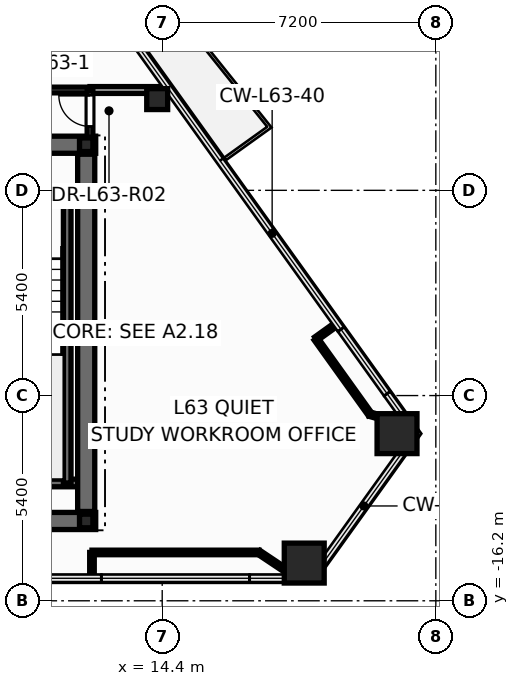
"""IFC4 building model, lengths in metres.
Left out: names, types, materials, properties, quantities, classifications, styles, units other than length and angle.
Written with IfcOpenShell. Run it as: python <this file> out.ifc"""

import sys

from ifc_helpers import new_model, si_unit, direction, frame, frame_2d, origin, origin_2d, place, context, subcontext, project, spatial, rectangle, hollow_rectangle, hollow_circle, i_section, extrude, element, fill, save


model = new_model("IFC4")
c1 = context("Model", 3, precision=1e-05, world=origin(), true_north=direction((0.0, 1.0)))
c2 = subcontext(c1, "Body", "Model", "MODEL_VIEW")
j1 = project(units=[si_unit("LENGTHUNIT", "METRE"), si_unit("PLANEANGLEUNIT", "RADIAN")], contexts=[c1])
p1 = place(None, origin())
s1 = spatial("IfcSite", under=j1, at=p1, CompositionType="ELEMENT")
p2 = place(p1, origin())
s2 = spatial("IfcBuilding", under=s1, at=p2, CompositionType="ELEMENT")
p3 = place(p2, frame((0.0, 0.0, 240.6)))
s3 = spatial("IfcBuildingStorey", under=s2, at=p3, CompositionType="ELEMENT", Elevation=240.6)
for number, where, z_axis, x_axis in (
    (1, (18.137, -15.208, 0.0), (0.0, 0.0, 1.0), (1.0, 0.0, 0.0)),
    (2, (20.579, -11.802, 0.0), (0.0, 0.0, 1.0), (1.0, 0.0, 0.0)),
):
    element("IfcColumn", number, at=place(p3, frame(where, z_axis=z_axis, x_axis=x_axis)), inside=s3, PredefinedType="COLUMN", context=c2, shape_type="SweptSolid", body=[
        extrude(hollow_rectangle(XDim=1.05, YDim=1.05, WallThickness=0.045, at=origin_2d()), origin(), (0.0, 0.0, 1.0), 3.6),
    ])
p4 = place(p3, frame((14.268, -2.999, 0.0), z_axis=(0.0, 0.0, 1.0), x_axis=(1.0, 0.0, 0.0)))
e3 = element("IfcColumn", 3, at=p4, inside=s3, PredefinedType="COLUMN", context=c2, shape_type="SweptSolid", body=[
    extrude(hollow_circle(Radius=0.275, WallThickness=0.024, at=origin_2d()), origin(), (0.0, 0.0, 1.0), 3.6),
])
for number, where, z_axis, x_axis in (
    (4, (12.4, -14.1, 0.0), (0.0, 0.0, 1.0), (1.0, 0.0, 0.0)),
    (5, (12.4, -4.2, 0.0), (0.0, 0.0, 1.0), (1.0, 0.0, 0.0)),
):
    element("IfcColumn", number, at=place(p3, frame(where, z_axis=z_axis, x_axis=x_axis)), inside=s3, PredefinedType="COLUMN", context=c2, shape_type="SweptSolid", body=[
        extrude(i_section(OverallWidth=0.352, OverallDepth=0.359, WebThickness=0.018, FlangeThickness=0.026, at=origin_2d()), origin(), (0.0, 0.0, 1.0), 3.6),
    ])
p5 = place(p3, frame((-12.65, -14.1, 0.0), z_axis=(0.0, 0.0, 1.0), x_axis=(1.0, 0.0, 0.0)))
e6 = element("IfcWall", 6, at=p5, inside=s3, PredefinedType="SHEAR", context=c2, shape_type="SweptSolid", body=[
    extrude(rectangle(XDim=25.3, YDim=0.45, at=frame_2d((12.65, 0.0))), origin(), (0.0, 0.0, 1.0), 3.6),
])
p6 = place(p3, frame((-12.65, -4.2, 0.0), z_axis=(0.0, 0.0, 1.0), x_axis=(1.0, 0.0, 0.0)))
e7 = element("IfcWall", 7, at=p6, inside=s3, PredefinedType="SHEAR", context=c2, shape_type="SweptSolid", body=[
    extrude(rectangle(XDim=25.3, YDim=0.45, at=frame_2d((12.65, 0.0))), origin(), (0.0, 0.0, 1.0), 3.6),
])
p7 = place(p6, frame((1.85, 0.0, 0.0)))
e8 = element("IfcOpeningElement", 8, at=p7, cuts=e7, PredefinedType="OPENING", context=c2, shape_type="SweptSolid", body=[
    extrude(rectangle(XDim=0.756, YDim=2.054, at=frame_2d((0.375, 1.027))), frame((0.0, 0.235, 0.0), z_axis=(0.0, -1.0, 0.0), x_axis=(1.0, 0.0, 0.0)), (0.0, 0.0, 1.0), 0.47),
])
p8 = place(p6, frame((22.65, 0.0, 0.0)))
e9 = element("IfcOpeningElement", 9, at=p8, cuts=e7, PredefinedType="OPENING", context=c2, shape_type="SweptSolid", body=[
    extrude(rectangle(XDim=0.756, YDim=2.054, at=frame_2d((0.375, 1.027))), frame((0.0, 0.235, 0.0), z_axis=(0.0, -1.0, 0.0), x_axis=(1.0, 0.0, 0.0)), (0.0, 0.0, 1.0), 0.47),
])
p9 = place(p6, frame((5.85, 0.0, 0.0)))
e10 = element("IfcOpeningElement", 10, at=p9, cuts=e7, PredefinedType="OPENING", context=c2, shape_type="SweptSolid", body=[
    extrude(rectangle(XDim=1.006, YDim=2.104, at=frame_2d((0.5, 1.052))), frame((0.0, 0.235, 0.0), z_axis=(0.0, -1.0, 0.0), x_axis=(1.0, 0.0, 0.0)), (0.0, 0.0, 1.0), 0.47),
])
p10 = place(p6, frame((10.35, 0.0, 0.0)))
e11 = element("IfcOpeningElement", 11, at=p10, cuts=e7, PredefinedType="OPENING", context=c2, shape_type="SweptSolid", body=[
    extrude(rectangle(XDim=1.406, YDim=2.154, at=frame_2d((0.7, 1.077))), frame((0.0, 0.235, 0.0), z_axis=(0.0, -1.0, 0.0), x_axis=(1.0, 0.0, 0.0)), (0.0, 0.0, 1.0), 0.47),
])
p11 = place(p6, frame((18.45, 0.0, 0.0)))
e12 = element("IfcOpeningElement", 12, at=p11, cuts=e7, PredefinedType="OPENING", context=c2, shape_type="SweptSolid", body=[
    extrude(rectangle(XDim=1.006, YDim=2.104, at=frame_2d((0.5, 1.052))), frame((0.0, 0.235, 0.0), z_axis=(0.0, -1.0, 0.0), x_axis=(1.0, 0.0, 0.0)), (0.0, 0.0, 1.0), 0.47),
])
for number, where, z_axis, x_axis in (
    (13, (8.48, -5.52, 0.0), (0.0, 0.0, 1.0), (1.0, 0.0, 0.0)),
    (14, (8.48, -13.1, 0.0), (0.0, 0.0, 1.0), (1.0, 0.0, 0.0)),
):
    element("IfcWall", number, at=place(p3, frame(where, z_axis=z_axis, x_axis=x_axis)), inside=s3, PredefinedType="SOLIDWALL", context=c2, shape_type="SweptSolid", body=[
        extrude(rectangle(XDim=3.87, YDim=0.2, at=frame_2d((1.935, 0.0))), origin(), (0.0, 0.0, 1.0), 3.6),
    ])
p12 = place(p3, frame((11.9, -13.1, 0.0), z_axis=(0.0, 0.0, 1.0), x_axis=(0.0, 1.0, 0.0)))
e15 = element("IfcWall", 15, at=p12, inside=s3, PredefinedType="SOLIDWALL", context=c2, shape_type="SweptSolid", body=[
    extrude(rectangle(XDim=7.58, YDim=0.2, at=frame_2d((3.79, 0.0))), origin(), (0.0, 0.0, 1.0), 3.6),
])
p13 = place(p3, frame((12.4, -13.85, 0.0), z_axis=(0.0, 0.0, 1.0), x_axis=(0.0, 1.0, 0.0)))
e16 = element("IfcWall", 16, at=p13, inside=s3, PredefinedType="SHEAR", context=c2, shape_type="SweptSolid", body=[
    extrude(rectangle(XDim=9.4, YDim=0.45, at=frame_2d((4.7, 0.0))), origin(), (0.0, 0.0, 1.0), 3.6),
])
p14 = place(p3, frame((3.34, -2.76, 0.0), z_axis=(0.0, 0.0, 1.0), x_axis=(1.0, 0.0, 0.0)))
e17 = element("IfcWall", 17, at=p14, inside=s3, PredefinedType="PARTITIONING", context=c2, shape_type="SweptSolid", body=[
    extrude(rectangle(XDim=9.16, YDim=0.15, at=frame_2d((4.58, 0.0))), origin(), (0.0, 0.0, 1.0), 2.255),
])
p15 = place(p14, frame((0.399, 0.0, 0.0)))
e18 = element("IfcOpeningElement", 18, at=p15, cuts=e17, PredefinedType="OPENING", context=c2, shape_type="SweptSolid", body=[
    extrude(rectangle(XDim=0.906, YDim=2.104, at=frame_2d((0.45, 1.052))), frame((0.0, 0.085, 0.0), z_axis=(0.0, -1.0, 0.0), x_axis=(1.0, 0.0, 0.0)), (0.0, 0.0, 1.0), 0.17),
])
p16 = place(p3, frame((12.552, -14.928, 0.0), z_axis=(0.0, 0.0, 1.0), x_axis=(1.0, 0.0, 0.0)))
e19 = element("IfcWall", 19, at=p16, inside=s3, PredefinedType="PARTITIONING", context=c2, shape_type="SweptSolid", body=[
    extrude(rectangle(XDim=4.395, YDim=0.12, at=frame_2d((2.197, 0.0))), origin(), (0.0, 0.0, 1.0), 3.28),
])
p17 = place(p3, frame((12.5, -2.76, 0.0), z_axis=(0.0, 0.0, 1.0), x_axis=(1.0, 0.0, 0.0)))
e20 = element("IfcWall", 20, at=p17, inside=s3, PredefinedType="PARTITIONING", context=c2, shape_type="SweptSolid", body=[
    extrude(rectangle(XDim=2.088, YDim=0.18, at=frame_2d((1.044, 0.0))), origin(), (0.0, 0.0, 1.0), 2.653),
])
p18 = place(p3, frame((19.869, -11.292, 0.0), z_axis=(0.0, 0.0, 1.0), x_axis=(-0.58269400411, 0.812691637446, 0.0)))
e21 = element("IfcWall", 21, at=p18, inside=s3, PredefinedType="PARTITIONING", context=c2, shape_type="SweptSolid", body=[
    extrude(rectangle(XDim=2.441, YDim=0.12, at=frame_2d((1.221, 0.0))), origin(), (0.0, 0.0, 1.0), 2.255),
])
p19 = place(p3, frame((12.5, -4.24, 0.0), z_axis=(0.0, 0.0, 1.0), x_axis=(0.0, 1.0, 0.0)))
e22 = element("IfcWall", 22, at=p19, inside=s3, PredefinedType="PARTITIONING", context=c2, shape_type="SweptSolid", body=[
    extrude(rectangle(XDim=1.48, YDim=0.15, at=frame_2d((0.74, 0.0))), origin(), (0.0, 0.0, 1.0), 2.255),
])
p20 = place(p19, frame((0.522, 0.0, 0.0)))
e23 = element("IfcOpeningElement", 23, at=p20, cuts=e22, PredefinedType="OPENING", context=c2, shape_type="SweptSolid", body=[
    extrude(rectangle(XDim=0.826, YDim=2.104, at=frame_2d((0.41, 1.052))), frame((0.0, 0.085, 0.0), z_axis=(0.0, -1.0, 0.0), x_axis=(1.0, 0.0, 0.0)), (0.0, 0.0, 1.0), 0.17),
])
p21 = place(p3, frame((16.947, -14.928, 0.0), z_axis=(0.0, 0.0, 1.0), x_axis=(0.831434816422, -0.555622305205, 0.0)))
e24 = element("IfcWall", 24, at=p21, inside=s3, PredefinedType="PARTITIONING", context=c2, shape_type="SweptSolid", body=[
    extrude(rectangle(XDim=0.855, YDim=0.12, at=frame_2d((0.427, 0.0))), origin(), (0.0, 0.0, 1.0), 2.798),
])
p22 = place(p3, frame((20.689, -11.526, 0.0), z_axis=(0.0, 0.0, 1.0), x_axis=(-0.961480716813, 0.274872390751, 0.0)))
e25 = element("IfcWall", 25, at=p22, inside=s3, PredefinedType="PARTITIONING", context=c2, shape_type="SweptSolid", body=[
    extrude(rectangle(XDim=0.853, YDim=0.12, at=frame_2d((0.426, 0.0))), origin(), (0.0, 0.0, 1.0), 2.255),
])
p23 = place(p3, frame((12.552, -15.598, 0.0), z_axis=(0.0, 0.0, 1.0), x_axis=(0.0, 1.0, 0.0)))
e26 = element("IfcWall", 26, at=p23, inside=s3, PredefinedType="PARTITIONING", context=c2, shape_type="SweptSolid", body=[
    extrude(rectangle(XDim=0.67, YDim=0.12, at=frame_2d((0.335, 0.0))), origin(), (0.0, 0.0, 1.0), 2.798),
])
p24 = place(p3, frame((18.446, -9.308, 0.0), z_axis=(0.0, 0.0, 1.0), x_axis=(0.812673311452, 0.582719562786, 0.0)))
e27 = element("IfcWall", 27, at=p24, inside=s3, PredefinedType="PARTITIONING", context=c2, shape_type="SweptSolid", body=[
    extrude(rectangle(XDim=0.67, YDim=0.12, at=frame_2d((0.335, 0.0))), origin(), (0.0, 0.0, 1.0), 2.798),
])
p25 = place(p20, origin())
e28 = element("IfcDoor", 28, at=p25, inside=s3, OperationType="SINGLE_SWING_RIGHT", PredefinedType="DOOR", context=c2, shape_type="SweptSolid", body=[
    extrude(rectangle(XDim=0.82, YDim=2.1, at=frame_2d((0.41, 1.05))), frame((0.0, 0.025, 0.0), z_axis=(0.0, -1.0, 0.0), x_axis=(1.0, 0.0, 0.0)), (0.0, 0.0, 1.0), 0.05),
])
fill(e23, e28)
save(model, sys.argv[1])
